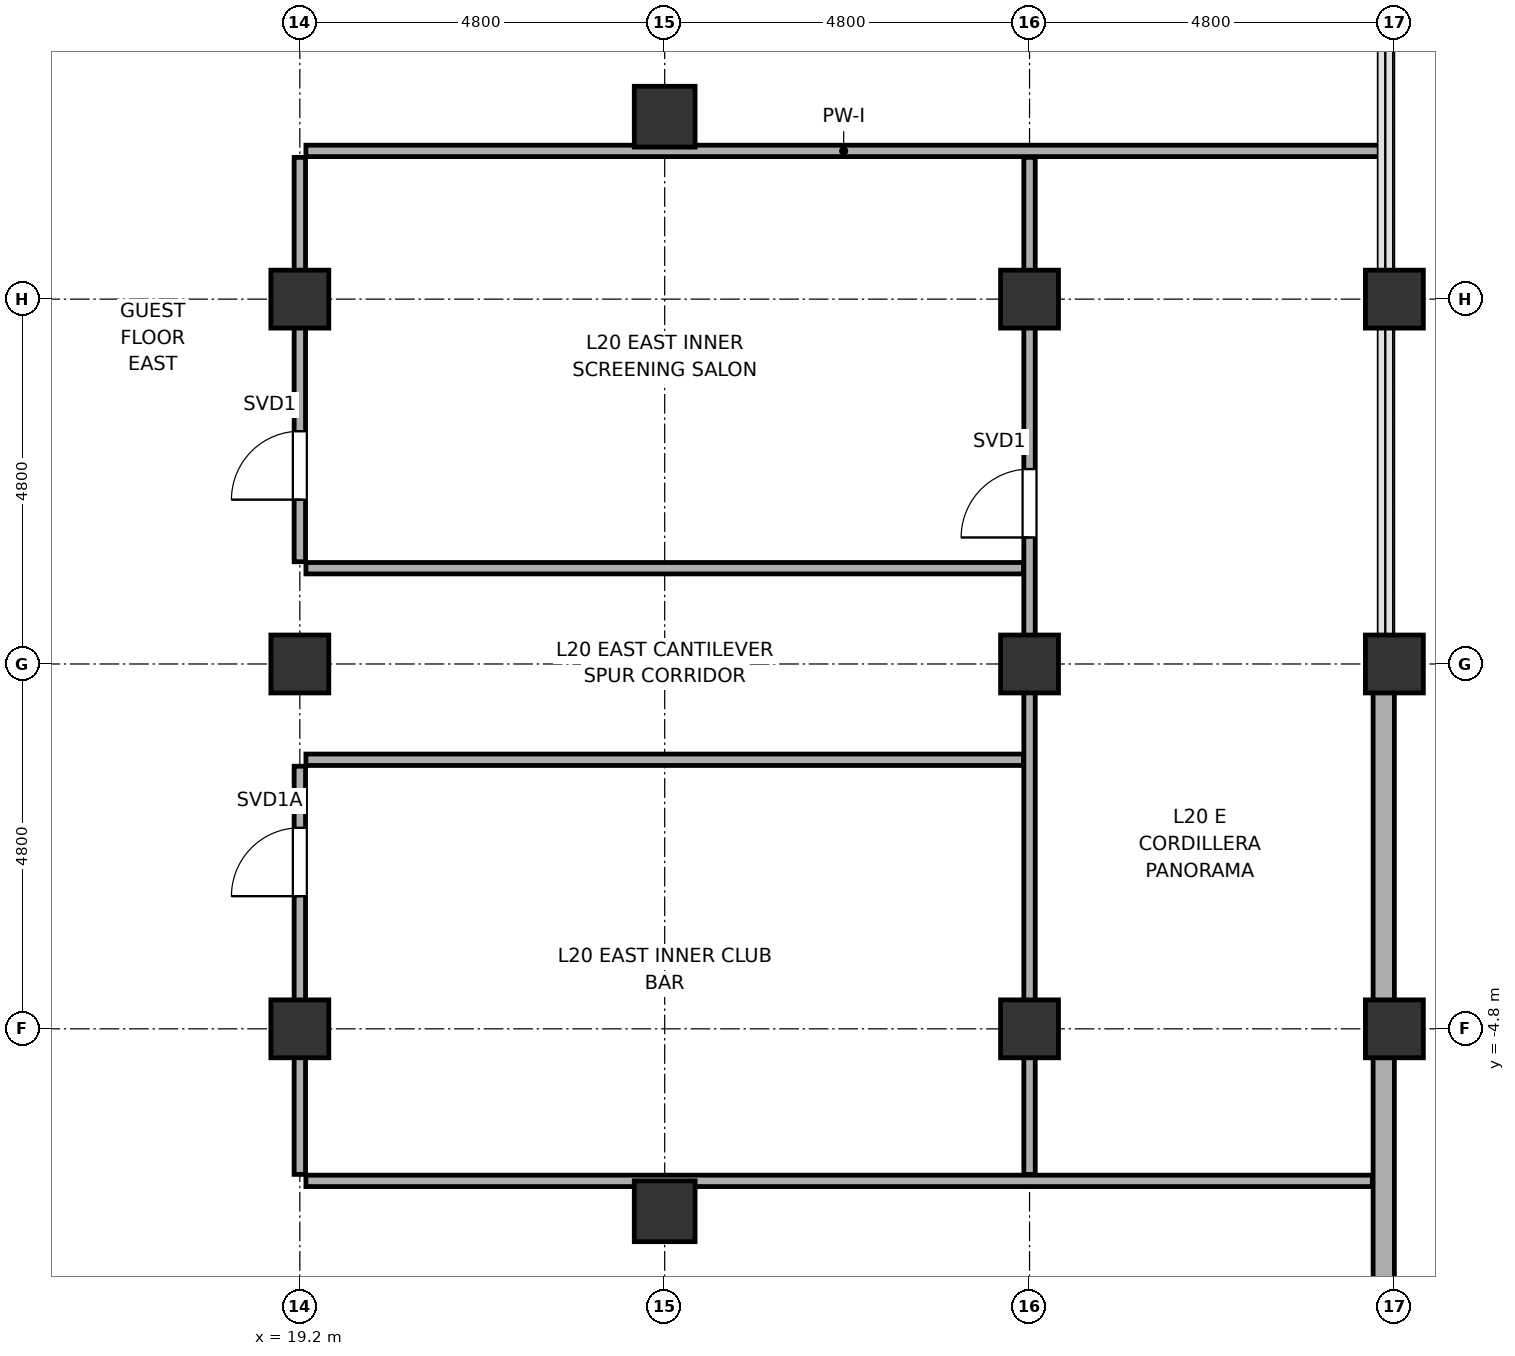
"""IFC4 building model, lengths in metres.
Left out: names, types, materials, properties, quantities, classifications, styles, units other than length and angle.
Written with IfcOpenShell. Run it as: python <this file> out.ifc"""

import sys

from ifc_helpers import new_model, si_unit, direction, frame, frame_2d, origin, origin_2d, place, context, subcontext, project, spatial, rectangle, hollow_rectangle, hollow_circle, extrude, element, fill, save


model = new_model("IFC4")
c1 = context("Model", 3, precision=1e-05, world=origin(), true_north=direction((0.0, 1.0)))
c2 = subcontext(c1, "Body", "Model", "MODEL_VIEW")
j1 = project(units=[si_unit("LENGTHUNIT", "METRE"), si_unit("PLANEANGLEUNIT", "RADIAN")], contexts=[c1])
p1 = place(None, origin())
s1 = spatial("IfcSite", under=j1, at=p1, CompositionType="ELEMENT")
p2 = place(p1, origin())
s2 = spatial("IfcBuilding", under=s1, at=p2, CompositionType="ELEMENT")
p3 = place(p2, frame((0.0, 0.0, 85.5)))
s3 = spatial("IfcBuildingStorey", under=s2, at=p3, CompositionType="ELEMENT", Elevation=85.5)
for number, where, z_axis, x_axis in (
    (1, (19.2, -4.8, 0.0), (0.0, 0.0, 1.0), (1.0, 0.0, 0.0)),
    (2, (19.2, 0.0, 0.0), (0.0, 0.0, 1.0), (1.0, 0.0, 0.0)),
    (3, (19.2, 4.8, 0.0), (0.0, 0.0, 1.0), (1.0, 0.0, 0.0)),
):
    element("IfcColumn", number, at=place(p3, frame(where, z_axis=z_axis, x_axis=x_axis)), inside=s3, PredefinedType="COLUMN", context=c2, shape_type="SweptSolid", body=[
        extrude(hollow_circle(Radius=0.381, WallThickness=0.032, at=origin_2d()), origin(), (0.0, 0.0, 1.0), 3.7),
    ])
for number, where, z_axis, x_axis in (
    (4, (24.0, -7.2, 0.0), (0.0, 0.0, 1.0), (1.0, 0.0, 0.0)),
    (5, (24.0, 7.2, 0.0), (0.0, 0.0, 1.0), (1.0, 0.0, 0.0)),
):
    element("IfcColumn", number, at=place(p3, frame(where, z_axis=z_axis, x_axis=x_axis)), inside=s3, PredefinedType="COLUMN", context=c2, shape_type="SweptSolid", body=[
        extrude(hollow_rectangle(XDim=0.8, YDim=0.8, WallThickness=0.036, at=origin_2d()), origin(), (0.0, 0.0, 1.0), 3.7),
    ])
for number, where, z_axis, x_axis in (
    (6, (28.8, -4.8, 0.0), (0.0, 0.0, 1.0), (1.0, 0.0, 0.0)),
    (7, (28.8, 0.0, 0.0), (0.0, 0.0, 1.0), (1.0, 0.0, 0.0)),
    (8, (28.8, 4.8, 0.0), (0.0, 0.0, 1.0), (1.0, 0.0, 0.0)),
    (9, (33.6, -4.8, 0.0), (0.0, 0.0, 1.0), (1.0, 0.0, 0.0)),
    (10, (33.6, 0.0, 0.0), (0.0, 0.0, 1.0), (1.0, 0.0, 0.0)),
    (11, (33.6, 4.8, 0.0), (0.0, 0.0, 1.0), (1.0, 0.0, 0.0)),
):
    element("IfcColumn", number, at=place(p3, frame(where, z_axis=z_axis, x_axis=x_axis)), inside=s3, PredefinedType="COLUMN", context=c2, shape_type="SweptSolid", body=[
        extrude(hollow_circle(Radius=0.381, WallThickness=0.032, at=origin_2d()), origin(), (0.0, 0.0, 1.0), 3.7),
    ])
p4 = place(p3, frame((33.46, -20.4, 0.0), z_axis=(0.0, 0.0, 1.0), x_axis=(0.0, 1.0, 0.0)))
e12 = element("IfcWall", 12, at=p4, inside=s3, PredefinedType="SOLIDWALL", context=c2, shape_type="SweptSolid", body=[
    extrude(rectangle(XDim=20.38, YDim=0.28, at=frame_2d((10.19, 0.0))), origin(), (0.0, 0.0, 1.0), 2.05),
])
p5 = place(p3, frame((19.28, -6.8, 0.0), z_axis=(0.0, 0.0, 1.0), x_axis=(1.0, 0.0, 0.0)))
e13 = element("IfcWall", 13, at=p5, inside=s3, PredefinedType="PARTITIONING", context=c2, shape_type="SweptSolid", body=[
    extrude(rectangle(XDim=14.03, YDim=0.15, at=frame_2d((7.015, 0.0))), origin(), (0.0, 0.0, 1.0), 2.05),
])
for number, where, z_axis, x_axis in (
    (14, (19.28, -1.26, 0.0), (0.0, 0.0, 1.0), (1.0, 0.0, 0.0)),
    (15, (19.28, 1.26, 0.0), (0.0, 0.0, 1.0), (1.0, 0.0, 0.0)),
):
    element("IfcWall", number, at=place(p3, frame(where, z_axis=z_axis, x_axis=x_axis)), inside=s3, PredefinedType="PARTITIONING", context=c2, shape_type="SweptSolid", body=[
        extrude(rectangle(XDim=9.44, YDim=0.15, at=frame_2d((4.72, 0.0))), origin(), (0.0, 0.0, 1.0), 2.75),
    ])
p6 = place(p3, frame((19.28, 6.75, 0.0), z_axis=(0.0, 0.0, 1.0), x_axis=(1.0, 0.0, 0.0)))
e16 = element("IfcWall", 16, at=p6, inside=s3, PredefinedType="PARTITIONING", context=c2, shape_type="SweptSolid", body=[
    extrude(rectangle(XDim=14.15, YDim=0.15, at=frame_2d((7.075, 0.0))), origin(), (0.0, 0.0, 1.0), 2.05),
])
p7 = place(p3, frame((19.2, -6.715, 0.0), z_axis=(0.0, 0.0, 1.0), x_axis=(0.0, 1.0, 0.0)))
e17 = element("IfcWall", 17, at=p7, inside=s3, PredefinedType="PARTITIONING", context=c2, shape_type="SweptSolid", body=[
    extrude(rectangle(XDim=5.37, YDim=0.15, at=frame_2d((2.685, 0.0))), origin(), (0.0, 0.0, 1.0), 2.05),
])
p8 = place(p7, frame((3.66, 0.0, 0.0)))
e18 = element("IfcOpeningElement", 18, at=p8, cuts=e17, PredefinedType="OPENING", context=c2, shape_type="SweptSolid", body=[
    extrude(rectangle(XDim=0.9, YDim=2.02, at=frame_2d((0.45, 1.01))), frame((0.0, 0.09, 0.0), z_axis=(0.0, -1.0, 0.0), x_axis=(1.0, 0.0, 0.0)), (0.0, 0.0, 1.0), 0.18),
])
p9 = place(p3, frame((19.2, 1.345, 0.0), z_axis=(0.0, 0.0, 1.0), x_axis=(0.0, 1.0, 0.0)))
e19 = element("IfcWall", 19, at=p9, inside=s3, PredefinedType="PARTITIONING", context=c2, shape_type="SweptSolid", body=[
    extrude(rectangle(XDim=5.32, YDim=0.15, at=frame_2d((2.66, 0.0))), origin(), (0.0, 0.0, 1.0), 2.75),
])
p10 = place(p9, frame((0.817, 0.0, 0.0)))
e20 = element("IfcOpeningElement", 20, at=p10, cuts=e19, PredefinedType="OPENING", context=c2, shape_type="SweptSolid", body=[
    extrude(rectangle(XDim=0.9, YDim=2.1, at=frame_2d((0.45, 1.05))), frame((0.0, 0.09, 0.0), z_axis=(0.0, -1.0, 0.0), x_axis=(1.0, 0.0, 0.0)), (0.0, 0.0, 1.0), 0.18),
])
p11 = place(p3, frame((28.8, -6.715, 0.0), z_axis=(0.0, 0.0, 1.0), x_axis=(0.0, 1.0, 0.0)))
e21 = element("IfcWall", 21, at=p11, inside=s3, PredefinedType="PARTITIONING", context=c2, shape_type="SweptSolid", body=[
    extrude(rectangle(XDim=13.38, YDim=0.15, at=frame_2d((6.69, 0.0))), origin(), (0.0, 0.0, 1.0), 2.75),
])
p12 = place(p11, frame((8.379, 0.0, 0.0)))
e22 = element("IfcOpeningElement", 22, at=p12, cuts=e21, PredefinedType="OPENING", context=c2, shape_type="SweptSolid", body=[
    extrude(rectangle(XDim=0.9, YDim=2.1, at=frame_2d((0.45, 1.05))), frame((0.0, 0.09, 0.0), z_axis=(0.0, -1.0, 0.0), x_axis=(1.0, 0.0, 0.0)), (0.0, 0.0, 1.0), 0.18),
])
p13 = place(p8, origin())
e23 = element("IfcDoor", 23, at=p13, inside=s3, OperationType="SINGLE_SWING_LEFT", PredefinedType="DOOR", context=c2, shape_type="SweptSolid", body=[
    extrude(rectangle(XDim=0.9, YDim=2.02, at=frame_2d((0.45, 1.01))), frame((0.0, 0.025, 0.0), z_axis=(0.0, -1.0, 0.0), x_axis=(1.0, 0.0, 0.0)), (0.0, 0.0, 1.0), 0.05),
])
fill(e18, e23)
p14 = place(p10, origin())
e24 = element("IfcDoor", 24, at=p14, inside=s3, OperationType="SINGLE_SWING_RIGHT", PredefinedType="DOOR", context=c2, shape_type="SweptSolid", body=[
    extrude(rectangle(XDim=0.9, YDim=2.1, at=frame_2d((0.45, 1.05))), frame((0.0, 0.025, 0.0), z_axis=(0.0, -1.0, 0.0), x_axis=(1.0, 0.0, 0.0)), (0.0, 0.0, 1.0), 0.05),
])
fill(e20, e24)
p15 = place(p12, origin())
e25 = element("IfcDoor", 25, at=p15, inside=s3, OperationType="SINGLE_SWING_LEFT", PredefinedType="DOOR", context=c2, shape_type="SweptSolid", body=[
    extrude(rectangle(XDim=0.9, YDim=2.1, at=frame_2d((0.45, 1.05))), frame((0.0, 0.025, 0.0), z_axis=(0.0, -1.0, 0.0), x_axis=(1.0, 0.0, 0.0)), (0.0, 0.0, 1.0), 0.05),
])
fill(e22, e25)
save(model, sys.argv[1])
